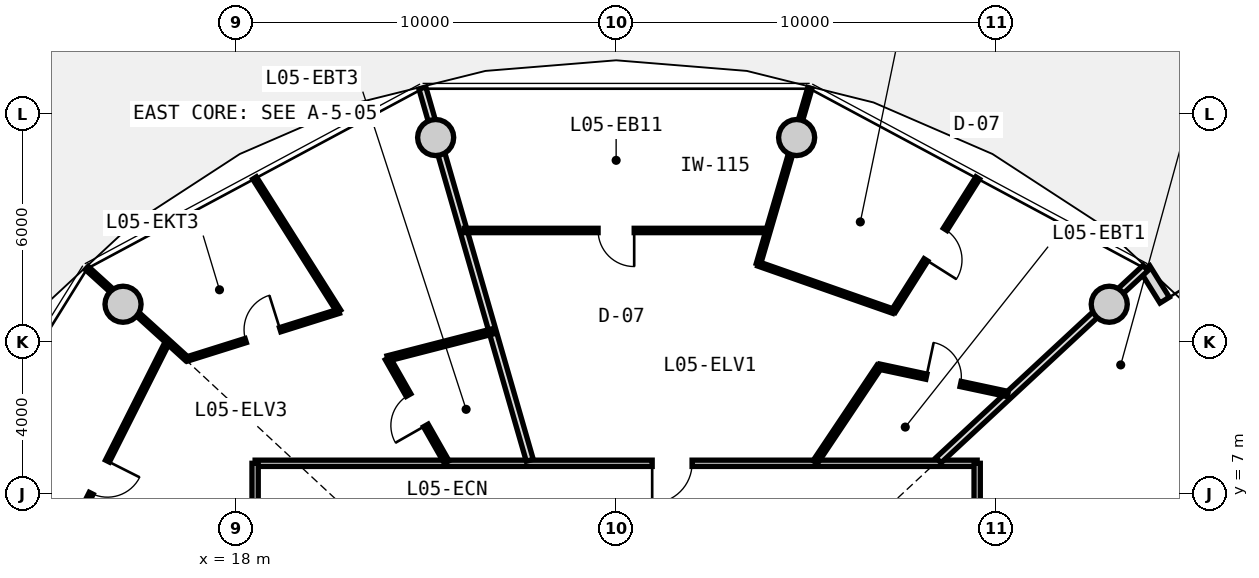
"""IFC4 building model, lengths in metres.
Left out: names, types, materials, properties, quantities, classifications, styles, units other than length and angle.
Written with IfcOpenShell. Run it as: python <this file> out.ifc"""

import sys

from ifc_helpers import new_model, si_unit, direction, frame, frame_2d, origin, origin_2d, place, context, subcontext, project, spatial, rectangle, circle, extrude, source, transform, mapped, element, fill, save


model = new_model("IFC4")
c1 = context("Model", 3, precision=1e-05, world=origin(), true_north=direction((0.0, 1.0)))
c2 = subcontext(c1, "Body", "Model", "MODEL_VIEW")
j1 = project(units=[si_unit("LENGTHUNIT", "METRE"), si_unit("PLANEANGLEUNIT", "RADIAN")], contexts=[c1])
p1 = place(None, origin())
s1 = spatial("IfcSite", under=j1, at=p1, CompositionType="ELEMENT")
p2 = place(p1, origin())
s2 = spatial("IfcBuilding", under=s1, at=p2, CompositionType="ELEMENT")
p3 = place(p2, frame((0.0, 0.0, 21.6)))
s3 = spatial("IfcBuildingStorey", under=s2, at=p3, CompositionType="ELEMENT", Elevation=21.6)
m1 = source(origin(), c2, "Body", "SweptSolid", [
    extrude(circle(Radius=0.475, at=origin_2d()), origin(), (0.0, 0.0, 1.0), 3.47),
])
for number, where, z_axis, x_axis in (
    (1, (40.975, 11.985, -0.42), (0.0, 0.0, 1.0), (1.0, 0.0, 0.0)),
    (2, (32.749, 16.373, -0.42), (0.0, 0.0, 1.0), (1.0, 0.0, 0.0)),
    (3, (23.251, 16.373, -0.42), (0.0, 0.0, 1.0), (1.0, 0.0, 0.0)),
    (4, (15.025, 11.985, -0.42), (0.0, 0.0, 1.0), (1.0, 0.0, 0.0)),
):
    element("IfcColumn", number, at=place(p3, frame(where, z_axis=z_axis, x_axis=x_axis)), inside=s3, PredefinedType="COLUMN", context=c2, shape_type="MappedRepresentation", body=[
        mapped(m1, transform((0.0, 0.0, 0.0), x_axis=(1.0, 0.0, 0.0), y_axis=(0.0, 1.0, 0.0), z_axis=(0.0, 0.0, 1.0), scale=1.0)),
    ])
m2 = source(origin(), c2, "Body", "SweptSolid", [
    extrude(rectangle(XDim=9.649, YDim=0.29, at=frame_2d((4.824, 0.0))), origin(), (0.0, 0.0, 1.0), 2.79),
])
p4 = place(p3, frame((41.916, 12.926, 0.0), z_axis=(0.0, 0.0, 1.0), x_axis=(0.527909458386, -0.849300655684, 0.0)))
e5 = element("IfcWall", 5, at=p4, inside=s3, PredefinedType="SOLIDWALL", context=c2, shape_type="MappedRepresentation", body=[
    mapped(m2, transform((0.0, 0.0, 0.0), x_axis=(1.0, 0.0, 0.0), y_axis=(0.0, 1.0, 0.0), z_axis=(0.0, 0.0, 1.0), scale=1.0)),
])
p5 = place(p4, frame((0.98, 0.0, 0.0)))
e6 = element("IfcOpeningElement", 6, at=p5, cuts=e5, PredefinedType="OPENING", context=c2, shape_type="SweptSolid", body=[
    extrude(rectangle(XDim=1.15, YDim=2.25, at=frame_2d((0.575, 1.125))), frame((0.0, 0.155, 0.0), z_axis=(0.0, -1.0, 0.0), x_axis=(1.0, 0.0, 0.0)), (0.0, 0.0, 1.0), 0.31),
])
p6 = place(p4, frame((5.174, 0.0, 0.85)))
e7 = element("IfcOpeningElement", 7, at=p6, cuts=e5, PredefinedType="OPENING", context=c2, shape_type="SweptSolid", body=[
    extrude(rectangle(XDim=1.2, YDim=1.5, at=frame_2d((0.6, 0.75))), frame((0.0, 0.155, 0.0), z_axis=(0.0, -1.0, 0.0), x_axis=(1.0, 0.0, 0.0)), (0.0, 0.0, 1.0), 0.31),
])
m3 = source(origin(), c2, "Body", "SweptSolid", [
    extrude(rectangle(XDim=19.0, YDim=0.165, at=frame_2d((9.5, 0.0))), origin(), (0.0, 0.0, 1.0), 2.775),
])
p7 = place(p3, frame((18.5, 7.8, 0.0), z_axis=(0.0, 0.0, 1.0), x_axis=(1.0, 0.0, 0.0)))
e8 = element("IfcWall", 8, at=p7, inside=s3, PredefinedType="PARTITIONING", context=c2, shape_type="MappedRepresentation", body=[
    mapped(m3, transform((0.0, 0.0, 0.0), x_axis=(1.0, 0.0, 0.0), y_axis=(0.0, 1.0, 0.0), z_axis=(0.0, 0.0, 1.0), scale=1.0)),
])
p8 = place(p7, frame((10.448, 0.0, 0.0)))
e9 = element("IfcOpeningElement", 9, at=p8, cuts=e8, PredefinedType="OPENING", context=c2, shape_type="SweptSolid", body=[
    extrude(rectangle(XDim=1.05, YDim=2.15, at=frame_2d((0.525, 1.075))), frame((0.0, 0.093, 0.0), z_axis=(0.0, -1.0, 0.0), x_axis=(1.0, 0.0, 0.0)), (0.0, 0.0, 1.0), 0.185),
])
m4 = source(origin(), c2, "Body", "SweptSolid", [
    extrude(rectangle(XDim=15.6, YDim=0.165, at=frame_2d((7.8, 0.0))), origin(), (0.0, 0.0, 1.0), 2.775),
])
p9 = place(p3, frame((18.5, -7.8, 0.0), z_axis=(0.0, 0.0, 1.0), x_axis=(0.0, 1.0, 0.0)))
e10 = element("IfcWall", 10, at=p9, inside=s3, PredefinedType="PARTITIONING", context=c2, shape_type="MappedRepresentation", body=[
    mapped(m4, transform((0.0, 0.0, 0.0), x_axis=(1.0, 0.0, 0.0), y_axis=(0.0, 1.0, 0.0), z_axis=(0.0, 0.0, 1.0), scale=1.0)),
])
p10 = place(p9, frame((12.241, 0.0, 0.0)))
e11 = element("IfcOpeningElement", 11, at=p10, cuts=e10, PredefinedType="OPENING", context=c2, shape_type="SweptSolid", body=[
    extrude(rectangle(XDim=1.05, YDim=2.15, at=frame_2d((0.525, 1.075))), frame((0.0, 0.093, 0.0), z_axis=(0.0, -1.0, 0.0), x_axis=(1.0, 0.0, 0.0)), (0.0, 0.0, 1.0), 0.185),
])
p11 = place(p9, frame((3.63, 0.0, 0.0)))
e12 = element("IfcOpeningElement", 12, at=p11, cuts=e10, PredefinedType="OPENING", context=c2, shape_type="SweptSolid", body=[
    extrude(rectangle(XDim=1.05, YDim=2.15, at=frame_2d((0.525, 1.075))), frame((0.0, 0.093, 0.0), z_axis=(0.0, -1.0, 0.0), x_axis=(1.0, 0.0, 0.0)), (0.0, 0.0, 1.0), 0.185),
])
p12 = place(p3, frame((37.5, 7.8, 0.0), z_axis=(0.0, 0.0, 1.0), x_axis=(0.0, -1.0, 0.0)))
e13 = element("IfcWall", 13, at=p12, inside=s3, PredefinedType="PARTITIONING", context=c2, shape_type="MappedRepresentation", body=[
    mapped(m4, transform((0.0, 0.0, 0.0), x_axis=(1.0, 0.0, 0.0), y_axis=(0.0, 1.0, 0.0), z_axis=(0.0, 0.0, 1.0), scale=1.0)),
])
p13 = place(p12, frame((12.141, 0.0, 0.0)))
e14 = element("IfcOpeningElement", 14, at=p13, cuts=e13, PredefinedType="OPENING", context=c2, shape_type="SweptSolid", body=[
    extrude(rectangle(XDim=1.25, YDim=2.2, at=frame_2d((0.625, 1.1))), frame((0.0, 0.093, 0.0), z_axis=(0.0, -1.0, 0.0), x_axis=(1.0, 0.0, 0.0)), (0.0, 0.0, 1.0), 0.185),
])
p14 = place(p12, frame((6.196, 0.0, 0.0)))
e15 = element("IfcOpeningElement", 15, at=p14, cuts=e13, PredefinedType="OPENING", context=c2, shape_type="SweptSolid", body=[
    extrude(rectangle(XDim=1.05, YDim=2.15, at=frame_2d((0.525, 1.075))), frame((0.0, 0.093, 0.0), z_axis=(0.0, -1.0, 0.0), x_axis=(1.0, 0.0, 0.0)), (0.0, 0.0, 1.0), 0.185),
])
p15 = place(p12, frame((1.092, 0.0, 0.0)))
e16 = element("IfcOpeningElement", 16, at=p15, cuts=e13, PredefinedType="OPENING", context=c2, shape_type="SweptSolid", body=[
    extrude(rectangle(XDim=1.05, YDim=2.15, at=frame_2d((0.525, 1.075))), frame((0.0, 0.093, 0.0), z_axis=(0.0, -1.0, 0.0), x_axis=(1.0, 0.0, 0.0)), (0.0, 0.0, 1.0), 0.185),
])
m5 = source(origin(), c2, "Body", "SweptSolid", [
    extrude(rectangle(XDim=7.435, YDim=0.19, at=frame_2d((3.717, 0.0))), origin(), (0.0, 0.0, 1.0), 2.225),
])
p16 = place(p3, frame((36.483, 7.88, 0.0), z_axis=(0.0, 0.0, 1.0), x_axis=(0.732651956848, 0.680603489652, 0.0)))
e17 = element("IfcWall", 17, at=p16, inside=s3, PredefinedType="PARTITIONING", context=c2, shape_type="MappedRepresentation", body=[
    mapped(m5, transform((0.0, 0.0, 0.0), x_axis=(1.0, 0.0, 0.0), y_axis=(0.0, 1.0, 0.0), z_axis=(0.0, 0.0, 1.0), scale=1.0)),
])
m6 = source(origin(), c2, "Body", "SweptSolid", [
    extrude(rectangle(XDim=10.196, YDim=0.19, at=frame_2d((5.098, 0.0))), origin(), (0.0, 0.0, 1.0), 2.225),
])
p17 = place(p3, frame((25.727, 7.88, 0.0), z_axis=(0.0, 0.0, 1.0), x_axis=(-0.277136420347, 0.960830580549, 0.0)))
e18 = element("IfcWall", 18, at=p17, inside=s3, PredefinedType="PARTITIONING", context=c2, shape_type="MappedRepresentation", body=[
    mapped(m6, transform((0.0, 0.0, 0.0), x_axis=(1.0, 0.0, 0.0), y_axis=(0.0, 1.0, 0.0), z_axis=(0.0, 0.0, 1.0), scale=1.0)),
])
m7 = source(origin(), c2, "Body", "SweptSolid", [
    extrude(rectangle(XDim=7.993, YDim=0.115, at=frame_2d((3.996, 0.0))), origin(), (0.0, 0.0, 1.0), 2.775),
])
p18 = place(p3, frame((31.996, 13.927, 0.0), z_axis=(0.0, 0.0, 1.0), x_axis=(-1.0, 0.0, 0.0)))
e19 = element("IfcWall", 19, at=p18, inside=s3, PredefinedType="PARTITIONING", context=c2, shape_type="MappedRepresentation", body=[
    mapped(m7, transform((0.0, 0.0, 0.0), x_axis=(1.0, 0.0, 0.0), y_axis=(0.0, 1.0, 0.0), z_axis=(0.0, 0.0, 1.0), scale=1.0)),
])
p19 = place(p18, frame((3.521, 0.0, 0.0)))
e20 = element("IfcOpeningElement", 20, at=p19, cuts=e19, PredefinedType="OPENING", context=c2, shape_type="SweptSolid", body=[
    extrude(rectangle(XDim=0.95, YDim=2.1, at=frame_2d((0.475, 1.05))), frame((0.0, 0.067, 0.0), z_axis=(0.0, -1.0, 0.0), x_axis=(1.0, 0.0, 0.0)), (0.0, 0.0, 1.0), 0.135),
])
m8 = source(origin(), c2, "Body", "SweptSolid", [
    extrude(rectangle(XDim=4.829, YDim=0.115, at=frame_2d((2.415, 0.0))), origin(), (0.0, 0.0, 1.0), 2.225),
])
p20 = place(p3, frame((31.742, 13.042, 0.0), z_axis=(0.0, 0.0, 1.0), x_axis=(0.280838556456, 0.959755023539, 0.0)))
e21 = element("IfcWall", 21, at=p20, inside=s3, PredefinedType="PARTITIONING", context=c2, shape_type="MappedRepresentation", body=[
    mapped(m8, transform((0.0, 0.0, 0.0), x_axis=(1.0, 0.0, 0.0), y_axis=(0.0, 1.0, 0.0), z_axis=(0.0, 0.0, 1.0), scale=1.0)),
])
m9 = source(origin(), c2, "Body", "SweptSolid", [
    extrude(rectangle(XDim=3.025, YDim=0.14, at=frame_2d((1.513, 0.0))), origin(), (0.0, 0.0, 1.0), 2.775),
])
p21 = place(p3, frame((33.24, 7.83, 0.0), z_axis=(0.0, 0.0, 1.0), x_axis=(0.556189165904, 0.831055721195, 0.0)))
e22 = element("IfcWall", 22, at=p21, inside=s3, PredefinedType="PARTITIONING", context=c2, shape_type="MappedRepresentation", body=[
    mapped(m9, transform((0.0, 0.0, 0.0), x_axis=(1.0, 0.0, 0.0), y_axis=(0.0, 1.0, 0.0), z_axis=(0.0, 0.0, 1.0), scale=1.0)),
])
m10 = source(origin(), c2, "Body", "SweptSolid", [
    extrude(rectangle(XDim=3.459, YDim=0.14, at=frame_2d((1.729, 0.0))), origin(), (0.0, 0.0, 1.0), 2.775),
])
p22 = place(p3, frame((34.922, 10.344, 0.0), z_axis=(0.0, 0.0, 1.0), x_axis=(0.978006468578, -0.208574560815, 0.0)))
e23 = element("IfcWall", 23, at=p22, inside=s3, PredefinedType="PARTITIONING", context=c2, shape_type="MappedRepresentation", body=[
    mapped(m10, transform((0.0, 0.0, 0.0), x_axis=(1.0, 0.0, 0.0), y_axis=(0.0, 1.0, 0.0), z_axis=(0.0, 0.0, 1.0), scale=1.0)),
])
p23 = place(p22, frame((1.27, 0.0, 0.0)))
e24 = element("IfcOpeningElement", 24, at=p23, cuts=e23, PredefinedType="OPENING", context=c2, shape_type="SweptSolid", body=[
    extrude(rectangle(XDim=0.92, YDim=2.1, at=frame_2d((0.46, 1.05))), frame((0.0, 0.08, 0.0), z_axis=(0.0, -1.0, 0.0), x_axis=(1.0, 0.0, 0.0)), (0.0, 0.0, 1.0), 0.16),
])
m11 = source(origin(), c2, "Body", "SweptSolid", [
    extrude(rectangle(XDim=4.15, YDim=0.115, at=frame_2d((2.075, 0.0))), origin(), (0.0, 0.0, 1.0), 2.775),
])
p24 = place(p3, frame((35.296, 11.801, 0.0), z_axis=(0.0, 0.0, 1.0), x_axis=(0.534475378192, 0.845184045109, 0.0)))
e25 = element("IfcWall", 25, at=p24, inside=s3, PredefinedType="PARTITIONING", context=c2, shape_type="MappedRepresentation", body=[
    mapped(m11, transform((0.0, 0.0, 0.0), x_axis=(1.0, 0.0, 0.0), y_axis=(0.0, 1.0, 0.0), z_axis=(0.0, 0.0, 1.0), scale=1.0)),
])
p25 = place(p24, frame((1.6, 0.0, 0.0)))
e26 = element("IfcOpeningElement", 26, at=p25, cuts=e25, PredefinedType="OPENING", context=c2, shape_type="SweptSolid", body=[
    extrude(rectangle(XDim=0.95, YDim=2.1, at=frame_2d((0.475, 1.05))), frame((0.0, 0.067, 0.0), z_axis=(0.0, -1.0, 0.0), x_axis=(1.0, 0.0, 0.0)), (0.0, 0.0, 1.0), 0.135),
])
m12 = source(origin(), c2, "Body", "SweptSolid", [
    extrude(rectangle(XDim=3.765, YDim=0.115, at=frame_2d((1.882, 0.0))), origin(), (0.0, 0.0, 1.0), 2.775),
])
p26 = place(p3, frame((35.296, 11.801, 0.0), z_axis=(0.0, 0.0, 1.0), x_axis=(-0.943788572669, 0.330549739222, 0.0)))
e27 = element("IfcWall", 27, at=p26, inside=s3, PredefinedType="PARTITIONING", context=c2, shape_type="MappedRepresentation", body=[
    mapped(m12, transform((0.0, 0.0, 0.0), x_axis=(1.0, 0.0, 0.0), y_axis=(0.0, 1.0, 0.0), z_axis=(0.0, 0.0, 1.0), scale=1.0)),
])
m13 = source(origin(), c2, "Body", "SweptSolid", [
    extrude(rectangle(XDim=8.018, YDim=0.115, at=frame_2d((4.009, 0.0))), origin(), (0.0, 0.0, 1.0), 2.775),
])
p27 = place(p3, frame((16.205, 11.014, 0.0), z_axis=(0.0, 0.0, 1.0), x_axis=(-0.450134355233, -0.89296084026, 0.0)))
e28 = element("IfcWall", 28, at=p27, inside=s3, PredefinedType="PARTITIONING", context=c2, shape_type="MappedRepresentation", body=[
    mapped(m13, transform((0.0, 0.0, 0.0), x_axis=(1.0, 0.0, 0.0), y_axis=(0.0, 1.0, 0.0), z_axis=(0.0, 0.0, 1.0), scale=1.0)),
])
p28 = place(p27, frame((3.534, 0.0, 0.0)))
e29 = element("IfcOpeningElement", 29, at=p28, cuts=e28, PredefinedType="OPENING", context=c2, shape_type="SweptSolid", body=[
    extrude(rectangle(XDim=0.95, YDim=2.1, at=frame_2d((0.475, 1.05))), frame((0.0, 0.067, 0.0), z_axis=(0.0, -1.0, 0.0), x_axis=(1.0, 0.0, 0.0)), (0.0, 0.0, 1.0), 0.135),
])
m14 = source(origin(), c2, "Body", "SweptSolid", [
    extrude(rectangle(XDim=3.551, YDim=0.115, at=frame_2d((1.775, 0.0))), origin(), (0.0, 0.0, 1.0), 2.225),
])
p29 = place(p3, frame((16.698, 10.553, 0.0), z_axis=(0.0, 0.0, 1.0), x_axis=(-0.740291560769, 0.672285954824, 0.0)))
e30 = element("IfcWall", 30, at=p29, inside=s3, PredefinedType="PARTITIONING", context=c2, shape_type="MappedRepresentation", body=[
    mapped(m14, transform((0.0, 0.0, 0.0), x_axis=(1.0, 0.0, 0.0), y_axis=(0.0, 1.0, 0.0), z_axis=(0.0, 0.0, 1.0), scale=1.0)),
])
m15 = source(origin(), c2, "Body", "SweptSolid", [
    extrude(rectangle(XDim=3.141, YDim=0.14, at=frame_2d((1.571, 0.0))), origin(), (0.0, 0.0, 1.0), 2.775),
])
p30 = place(p3, frame((23.542, 7.83, 0.0), z_axis=(0.0, 0.0, 1.0), x_axis=(-0.494874486088, 0.868964465913, 0.0)))
e31 = element("IfcWall", 31, at=p30, inside=s3, PredefinedType="PARTITIONING", context=c2, shape_type="MappedRepresentation", body=[
    mapped(m15, transform((0.0, 0.0, 0.0), x_axis=(1.0, 0.0, 0.0), y_axis=(0.0, 1.0, 0.0), z_axis=(0.0, 0.0, 1.0), scale=1.0)),
])
p31 = place(p30, frame((1.111, 0.0, 0.0)))
e32 = element("IfcOpeningElement", 32, at=p31, cuts=e31, PredefinedType="OPENING", context=c2, shape_type="SweptSolid", body=[
    extrude(rectangle(XDim=0.92, YDim=2.1, at=frame_2d((0.46, 1.05))), frame((0.0, 0.08, 0.0), z_axis=(0.0, -1.0, 0.0), x_axis=(1.0, 0.0, 0.0)), (0.0, 0.0, 1.0), 0.16),
])
m16 = source(origin(), c2, "Body", "SweptSolid", [
    extrude(rectangle(XDim=2.868, YDim=0.14, at=frame_2d((1.434, 0.0))), origin(), (0.0, 0.0, 1.0), 2.775),
])
p32 = place(p3, frame((21.987, 10.56, 0.0), z_axis=(0.0, 0.0, 1.0), x_axis=(0.968467705195, 0.249139125778, 0.0)))
e33 = element("IfcWall", 33, at=p32, inside=s3, PredefinedType="PARTITIONING", context=c2, shape_type="MappedRepresentation", body=[
    mapped(m16, transform((0.0, 0.0, 0.0), x_axis=(1.0, 0.0, 0.0), y_axis=(0.0, 1.0, 0.0), z_axis=(0.0, 0.0, 1.0), scale=1.0)),
])
p33 = place(p3, frame((20.704, 11.801, 0.0), z_axis=(0.0, 0.0, 1.0), x_axis=(-0.534475378192, 0.845184045109, 0.0)))
e34 = element("IfcWall", 34, at=p33, inside=s3, PredefinedType="PARTITIONING", context=c2, shape_type="MappedRepresentation", body=[
    mapped(m11, transform((0.0, 0.0, 0.0), x_axis=(1.0, 0.0, 0.0), y_axis=(0.0, 1.0, 0.0), z_axis=(0.0, 0.0, 1.0), scale=1.0)),
])
m17 = source(origin(), c2, "Body", "SweptSolid", [
    extrude(rectangle(XDim=4.189, YDim=0.115, at=frame_2d((2.094, 0.0))), origin(), (0.0, 0.0, 1.0), 2.775),
])
p34 = place(p3, frame((20.704, 11.801, 0.0), z_axis=(0.0, 0.0, 1.0), x_axis=(-0.954002766053, -0.299797802467, 0.0)))
e35 = element("IfcWall", 35, at=p34, inside=s3, PredefinedType="PARTITIONING", context=c2, shape_type="MappedRepresentation", body=[
    mapped(m17, transform((0.0, 0.0, 0.0), x_axis=(1.0, 0.0, 0.0), y_axis=(0.0, 1.0, 0.0), z_axis=(0.0, 0.0, 1.0), scale=1.0)),
])
p35 = place(p34, frame((1.619, 0.0, 0.0)))
e36 = element("IfcOpeningElement", 36, at=p35, cuts=e35, PredefinedType="OPENING", context=c2, shape_type="SweptSolid", body=[
    extrude(rectangle(XDim=0.95, YDim=2.1, at=frame_2d((0.475, 1.05))), frame((0.0, 0.067, 0.0), z_axis=(0.0, -1.0, 0.0), x_axis=(1.0, 0.0, 0.0)), (0.0, 0.0, 1.0), 0.135),
])
m18 = source(origin(), c2, "Body", "SweptSolid", [
    extrude(rectangle(XDim=1.15, YDim=2.25, at=frame_2d((0.575, 1.125))), frame((0.0, 0.025, 0.0), z_axis=(0.0, -1.0, 0.0), x_axis=(1.0, 0.0, 0.0)), (0.0, 0.0, 1.0), 0.05),
])
p36 = place(p5, origin())
e37 = element("IfcDoor", 37, at=p36, inside=s3, OperationType="SINGLE_SWING_LEFT", PredefinedType="DOOR", context=c2, shape_type="MappedRepresentation", body=[
    mapped(m18, transform((0.0, 0.0, 0.0), x_axis=(1.0, 0.0, 0.0), y_axis=(0.0, 1.0, 0.0), z_axis=(0.0, 0.0, 1.0), scale=1.0)),
])
fill(e6, e37)
m19 = source(origin(), c2, "Body", "SweptSolid", [
    extrude(rectangle(XDim=1.05, YDim=2.15, at=frame_2d((0.525, 1.075))), frame((0.0, 0.025, 0.0), z_axis=(0.0, -1.0, 0.0), x_axis=(1.0, 0.0, 0.0)), (0.0, 0.0, 1.0), 0.05),
])
p37 = place(p8, frame((1.05, 0.0, 0.0), z_axis=(0.0, 0.0, 1.0), x_axis=(-1.0, 0.0, 0.0)))
e38 = element("IfcDoor", 38, at=p37, inside=s3, OperationType="SINGLE_SWING_RIGHT", PredefinedType="DOOR", context=c2, shape_type="MappedRepresentation", body=[
    mapped(m19, transform((0.0, 0.0, 0.0), x_axis=(1.0, 0.0, 0.0), y_axis=(0.0, 1.0, 0.0), z_axis=(0.0, 0.0, 1.0), scale=1.0)),
])
fill(e9, e38)
m20 = source(origin(), c2, "Body", "SweptSolid", [
    extrude(rectangle(XDim=0.92, YDim=2.1, at=frame_2d((0.46, 1.05))), frame((0.0, 0.025, 0.0), z_axis=(0.0, -1.0, 0.0), x_axis=(1.0, 0.0, 0.0)), (0.0, 0.0, 1.0), 0.05),
])
p38 = place(p23, origin())
e39 = element("IfcDoor", 39, at=p38, inside=s3, OperationType="SINGLE_SWING_LEFT", PredefinedType="DOOR", context=c2, shape_type="MappedRepresentation", body=[
    mapped(m20, transform((0.0, 0.0, 0.0), x_axis=(1.0, 0.0, 0.0), y_axis=(0.0, 1.0, 0.0), z_axis=(0.0, 0.0, 1.0), scale=1.0)),
])
fill(e24, e39)
m21 = source(origin(), c2, "Body", "SweptSolid", [
    extrude(rectangle(XDim=0.95, YDim=2.1, at=frame_2d((0.475, 1.05))), frame((0.0, 0.025, 0.0), z_axis=(0.0, -1.0, 0.0), x_axis=(1.0, 0.0, 0.0)), (0.0, 0.0, 1.0), 0.05),
])
p39 = place(p25, frame((0.95, 0.0, 0.0), z_axis=(0.0, 0.0, 1.0), x_axis=(-1.0, 0.0, 0.0)))
e40 = element("IfcDoor", 40, at=p39, inside=s3, OperationType="SINGLE_SWING_RIGHT", PredefinedType="DOOR", context=c2, shape_type="MappedRepresentation", body=[
    mapped(m21, transform((0.0, 0.0, 0.0), x_axis=(1.0, 0.0, 0.0), y_axis=(0.0, 1.0, 0.0), z_axis=(0.0, 0.0, 1.0), scale=1.0)),
])
fill(e26, e40)
p40 = place(p19, origin())
e41 = element("IfcDoor", 41, at=p40, inside=s3, OperationType="SINGLE_SWING_LEFT", PredefinedType="DOOR", context=c2, shape_type="MappedRepresentation", body=[
    mapped(m21, transform((0.0, 0.0, 0.0), x_axis=(1.0, 0.0, 0.0), y_axis=(0.0, 1.0, 0.0), z_axis=(0.0, 0.0, 1.0), scale=1.0)),
])
fill(e20, e41)
p41 = place(p31, origin())
e42 = element("IfcDoor", 42, at=p41, inside=s3, OperationType="SINGLE_SWING_LEFT", PredefinedType="DOOR", context=c2, shape_type="MappedRepresentation", body=[
    mapped(m20, transform((0.0, 0.0, 0.0), x_axis=(1.0, 0.0, 0.0), y_axis=(0.0, 1.0, 0.0), z_axis=(0.0, 0.0, 1.0), scale=1.0)),
])
fill(e32, e42)
p42 = place(p35, frame((0.95, 0.0, 0.0), z_axis=(0.0, 0.0, 1.0), x_axis=(-1.0, 0.0, 0.0)))
e43 = element("IfcDoor", 43, at=p42, inside=s3, OperationType="SINGLE_SWING_RIGHT", PredefinedType="DOOR", context=c2, shape_type="MappedRepresentation", body=[
    mapped(m21, transform((0.0, 0.0, 0.0), x_axis=(1.0, 0.0, 0.0), y_axis=(0.0, 1.0, 0.0), z_axis=(0.0, 0.0, 1.0), scale=1.0)),
])
fill(e36, e43)
p43 = place(p28, origin())
e44 = element("IfcDoor", 44, at=p43, inside=s3, OperationType="SINGLE_SWING_LEFT", PredefinedType="DOOR", context=c2, shape_type="MappedRepresentation", body=[
    mapped(m21, transform((0.0, 0.0, 0.0), x_axis=(1.0, 0.0, 0.0), y_axis=(0.0, 1.0, 0.0), z_axis=(0.0, 0.0, 1.0), scale=1.0)),
])
fill(e29, e44)
save(model, sys.argv[1])
